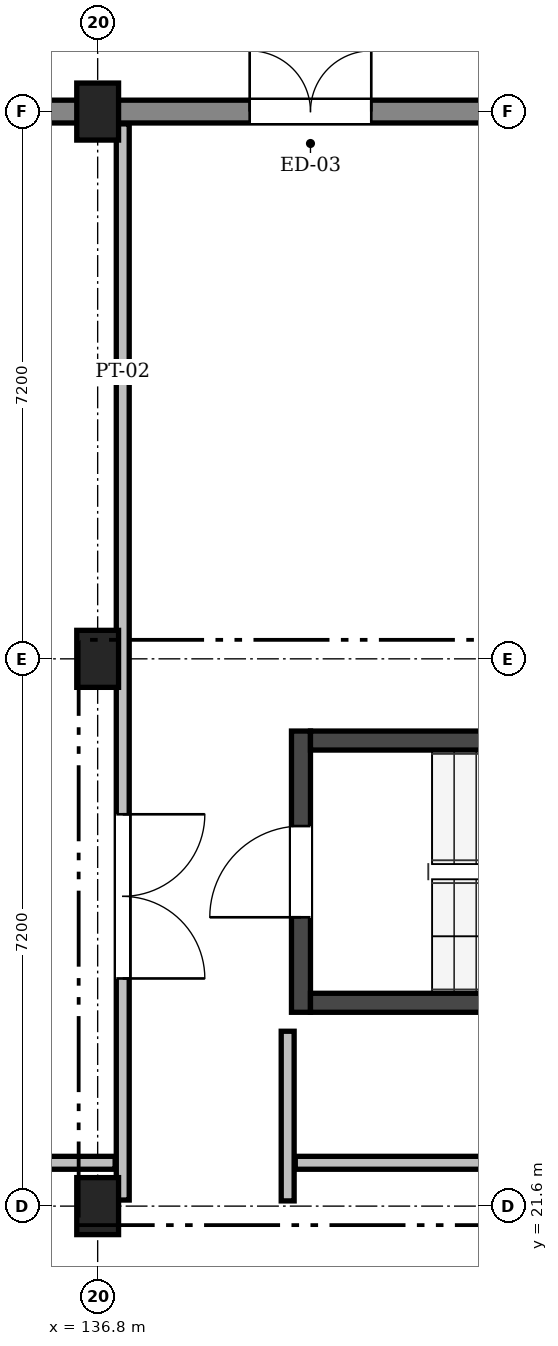
"""IFC4 building model, lengths in metres.
Left out: names, types, materials, properties, quantities, classifications, styles, units other than length and angle.
Written with IfcOpenShell. Run it as: python <this file> out.ifc"""

import sys

from ifc_helpers import new_model, si_unit, direction, frame, frame_2d, origin, origin_2d, place, context, subcontext, project, spatial, rectangle, extrude, element, fill, save


model = new_model("IFC4")
c1 = context("Model", 3, precision=1e-05, world=origin(), true_north=direction((0.0, 1.0)))
c2 = subcontext(c1, "Body", "Model", "MODEL_VIEW")
j1 = project(units=[si_unit("LENGTHUNIT", "METRE"), si_unit("PLANEANGLEUNIT", "RADIAN")], contexts=[c1])
p1 = place(None, origin())
s1 = spatial("IfcSite", under=j1, at=p1, CompositionType="ELEMENT")
p2 = place(p1, origin())
s2 = spatial("IfcBuilding", under=s1, at=p2, CompositionType="ELEMENT")
p3 = place(p2, origin())
s3 = spatial("IfcBuildingStorey", under=s2, at=p3, CompositionType="ELEMENT", Elevation=0.0)
for number, where, z_axis, x_axis in (
    (1, (136.8, 21.6, 0.0), (0.0, 0.0, 1.0), (1.0, 0.0, 0.0)),
    (2, (136.8, 28.8, 0.0), (0.0, 0.0, 1.0), (1.0, 0.0, 0.0)),
    (3, (136.8, 36.0, 0.0), (0.0, 0.0, 1.0), (1.0, 0.0, 0.0)),
):
    element("IfcColumn", number, at=place(p3, frame(where, z_axis=z_axis, x_axis=x_axis)), inside=s3, PredefinedType="COLUMN", context=c2, shape_type="SweptSolid", body=[
        extrude(rectangle(XDim=0.55, YDim=0.75, at=origin_2d()), origin(), (0.0, 0.0, 1.0), 4.8),
    ])
p4 = place(p3, frame((129.6, 36.0, 0.0), z_axis=(0.0, 0.0, 1.0), x_axis=(1.0, 0.0, 0.0)))
e4 = element("IfcWall", 4, at=p4, inside=s3, PredefinedType="SOLIDWALL", context=c2, shape_type="SweptSolid", body=[
    extrude(rectangle(XDim=7.2, YDim=0.3, at=frame_2d((3.6, 0.0))), origin(), (0.0, 0.0, 1.0), 4.52),
])
p5 = place(p4, frame((2.825, 0.0, 0.95)))
e5 = element("IfcOpeningElement", 5, at=p5, cuts=e4, PredefinedType="OPENING", context=c2, shape_type="SweptSolid", body=[
    extrude(rectangle(XDim=1.55, YDim=1.55, at=frame_2d((0.775, 0.775))), frame((0.0, 0.162, 0.0), z_axis=(0.0, -1.0, 0.0), x_axis=(1.0, 0.0, 0.0)), (0.0, 0.0, 1.0), 0.324),
])
p6 = place(p3, frame((136.8, 36.0, 0.0), z_axis=(0.0, 0.0, 1.0), x_axis=(1.0, 0.0, 0.0)))
e6 = element("IfcWall", 6, at=p6, inside=s3, PredefinedType="SOLIDWALL", context=c2, shape_type="SweptSolid", body=[
    extrude(rectangle(XDim=7.35, YDim=0.3, at=frame_2d((3.675, 0.0))), origin(), (0.0, 0.0, 1.0), 4.52),
])
p7 = place(p6, frame((2.0, 0.0, 0.0)))
e7 = element("IfcOpeningElement", 7, at=p7, cuts=e6, PredefinedType="OPENING", context=c2, shape_type="SweptSolid", body=[
    extrude(rectangle(XDim=1.6, YDim=2.2, at=frame_2d((0.8, 1.1))), frame((0.0, 0.162, 0.0), z_axis=(0.0, -1.0, 0.0), x_axis=(1.0, 0.0, 0.0)), (0.0, 0.0, 1.0), 0.324),
])
p8 = place(p3, frame((139.475, 24.15, 0.0), z_axis=(0.0, 0.0, 1.0), x_axis=(0.0, 1.0, 0.0)))
e8 = element("IfcWall", 8, at=p8, inside=s3, PredefinedType="SHEAR", context=c2, shape_type="SweptSolid", body=[
    extrude(rectangle(XDim=3.7, YDim=0.25, at=frame_2d((1.85, 0.0))), origin(), (0.0, 0.0, 1.0), 4.55),
])
p9 = place(p8, frame((1.25, 0.0, 0.0)))
e9 = element("IfcOpeningElement", 9, at=p9, cuts=e8, PredefinedType="OPENING", context=c2, shape_type="SweptSolid", body=[
    extrude(rectangle(XDim=1.2, YDim=2.15, at=frame_2d((0.6, 1.075))), frame((0.0, 0.137, 0.0), z_axis=(0.0, -1.0, 0.0), x_axis=(1.0, 0.0, 0.0)), (0.0, 0.0, 1.0), 0.274),
])
for number, where, z_axis, x_axis in (
    (10, (139.6, 24.275, 0.0), (0.0, 0.0, 1.0), (1.0, 0.0, 0.0)),
    (11, (139.6, 27.725, 0.0), (0.0, 0.0, 1.0), (1.0, 0.0, 0.0)),
):
    element("IfcWall", number, at=place(p3, frame(where, z_axis=z_axis, x_axis=x_axis)), inside=s3, PredefinedType="SHEAR", context=c2, shape_type="SweptSolid", body=[
        extrude(rectangle(XDim=7.6, YDim=0.25, at=frame_2d((3.8, 0.0))), origin(), (0.0, 0.0, 1.0), 4.55),
    ])
p10 = place(p3, frame((139.3, 21.668, 0.0), z_axis=(0.0, 0.0, 1.0), x_axis=(0.0, 1.0, 0.0)))
e12 = element("IfcWall", 12, at=p10, inside=s3, PredefinedType="PARTITIONING", context=c2, shape_type="SweptSolid", body=[
    extrude(rectangle(XDim=2.232, YDim=0.17, at=frame_2d((1.116, 0.0))), origin(), (0.0, 0.0, 1.0), 4.46),
])
p11 = place(p3, frame((137.13, 21.68, 0.0), z_axis=(0.0, 0.0, 1.0), x_axis=(0.0, 1.0, 0.0)))
e13 = element("IfcWall", 13, at=p11, inside=s3, PredefinedType="PARTITIONING", context=c2, shape_type="SweptSolid", body=[
    extrude(rectangle(XDim=14.158, YDim=0.17, at=frame_2d((7.079, 0.0))), origin(), (0.0, 0.0, 1.0), 4.08),
])
p12 = place(p11, frame((2.915, 0.0, 0.0)))
e14 = element("IfcOpeningElement", 14, at=p12, cuts=e13, PredefinedType="OPENING", context=c2, shape_type="SweptSolid", body=[
    extrude(rectangle(XDim=2.16, YDim=2.35, at=frame_2d((1.08, 1.175))), frame((0.0, 0.097, 0.0), z_axis=(0.0, -1.0, 0.0), x_axis=(1.0, 0.0, 0.0)), (0.0, 0.0, 1.0), 0.194),
])
p13 = place(p3, frame((139.4, 22.17, 0.0), z_axis=(0.0, 0.0, 1.0), x_axis=(1.0, 0.0, 0.0)))
e15 = element("IfcWall", 15, at=p13, inside=s3, PredefinedType="PARTITIONING", context=c2, shape_type="SweptSolid", body=[
    extrude(rectangle(XDim=5.612, YDim=0.17, at=frame_2d((2.806, 0.0))), origin(), (0.0, 0.0, 1.0), 4.46),
])
p14 = place(p3, frame((129.04, 22.17, 0.0), z_axis=(0.0, 0.0, 1.0), x_axis=(1.0, 0.0, 0.0)))
e16 = element("IfcWall", 16, at=p14, inside=s3, PredefinedType="PARTITIONING", context=c2, shape_type="SweptSolid", body=[
    extrude(rectangle(XDim=7.99, YDim=0.17, at=frame_2d((3.995, 0.0))), origin(), (0.0, 0.0, 1.0), 4.46),
])
p15 = place(p7, origin())
e17 = element("IfcDoor", 17, at=p15, inside=s3, OperationType="DOUBLE_DOOR_SINGLE_SWING", PredefinedType="DOOR", context=c2, shape_type="SweptSolid", body=[
    extrude(rectangle(XDim=1.6, YDim=2.2, at=frame_2d((0.8, 1.1))), frame((0.0, 0.025, 0.0), z_axis=(0.0, -1.0, 0.0), x_axis=(1.0, 0.0, 0.0)), (0.0, 0.0, 1.0), 0.05),
])
fill(e7, e17)
p16 = place(p9, origin())
e18 = element("IfcDoor", 18, at=p16, inside=s3, OperationType="SINGLE_SWING_LEFT", PredefinedType="DOOR", context=c2, shape_type="SweptSolid", body=[
    extrude(rectangle(XDim=1.2, YDim=2.15, at=frame_2d((0.6, 1.075))), frame((0.0, 0.025, 0.0), z_axis=(0.0, -1.0, 0.0), x_axis=(1.0, 0.0, 0.0)), (0.0, 0.0, 1.0), 0.05),
])
fill(e9, e18)
p17 = place(p12, frame((2.16, 0.0, 0.0), z_axis=(0.0, 0.0, 1.0), x_axis=(-1.0, 0.0, 0.0)))
e19 = element("IfcDoor", 19, at=p17, inside=s3, OperationType="DOUBLE_DOOR_SINGLE_SWING", PredefinedType="DOOR", context=c2, shape_type="SweptSolid", body=[
    extrude(rectangle(XDim=2.16, YDim=2.35, at=frame_2d((1.08, 1.175))), frame((0.0, 0.025, 0.0), z_axis=(0.0, -1.0, 0.0), x_axis=(1.0, 0.0, 0.0)), (0.0, 0.0, 1.0), 0.05),
])
fill(e14, e19)
save(model, sys.argv[1])
